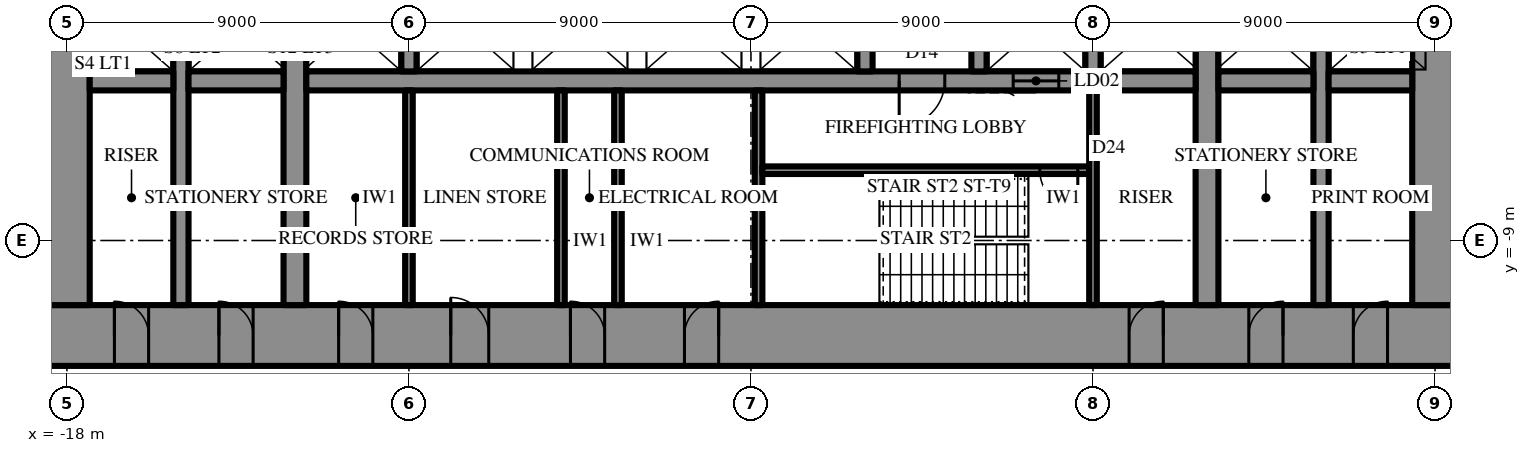
"""IFC4 building model, lengths in metres.
Left out: names, types, materials, properties, quantities, classifications, styles, units other than length and angle.
Written with IfcOpenShell. Run it as: python <this file> out.ifc"""

import sys

from ifc_helpers import new_model, si_unit, direction, frame, frame_2d, origin, place, context, subcontext, project, spatial, rectangle, extrude, element, fill, save


model = new_model("IFC4")
c1 = context("Model", 3, precision=1e-05, world=origin(), true_north=direction((0.0, 1.0)))
c2 = subcontext(c1, "Body", "Model", "MODEL_VIEW")
j1 = project(units=[si_unit("LENGTHUNIT", "METRE"), si_unit("PLANEANGLEUNIT", "RADIAN")], contexts=[c1])
p1 = place(None, origin())
s1 = spatial("IfcSite", under=j1, at=p1, CompositionType="ELEMENT")
p2 = place(p1, origin())
s2 = spatial("IfcBuilding", under=s1, at=p2, CompositionType="ELEMENT")
p3 = place(p2, frame((0.0, 0.0, 18.5)))
s3 = spatial("IfcBuildingStorey", under=s2, at=p3, CompositionType="ELEMENT", Elevation=18.5)
p4 = place(p3, frame((18.6, -11.5, 0.0), z_axis=(0.0, 0.0, 1.0), x_axis=(-1.0, 0.0, 0.0)))
e1 = element("IfcWall", 1, at=p4, inside=s3, PredefinedType="SHEAR", context=c2, shape_type="SweptSolid", body=[
    extrude(rectangle(XDim=37.2, YDim=1.6, at=frame_2d((18.6, 0.0))), origin(), (0.0, 0.0, 1.0), 5.0),
])
p5 = place(p4, frame((19.45, 0.0, 0.0)))
e2 = element("IfcOpeningElement", 2, at=p5, cuts=e1, PredefinedType="OPENING", context=c2, shape_type="SweptSolid", body=[
    extrude(rectangle(XDim=0.9, YDim=2.2, at=frame_2d((0.45, 1.1))), frame((0.0, 0.81, 0.0), z_axis=(0.0, -1.0, 0.0), x_axis=(1.0, 0.0, 0.0)), (0.0, 0.0, 1.0), 1.62),
])
p6 = place(p4, frame((22.45, 0.0, 0.0)))
e3 = element("IfcOpeningElement", 3, at=p6, cuts=e1, PredefinedType="OPENING", context=c2, shape_type="SweptSolid", body=[
    extrude(rectangle(XDim=0.9, YDim=2.2, at=frame_2d((0.45, 1.1))), frame((0.0, 0.81, 0.0), z_axis=(0.0, -1.0, 0.0), x_axis=(1.0, 0.0, 0.0)), (0.0, 0.0, 1.0), 1.62),
])
p7 = place(p4, frame((25.5, 0.0, 0.0)))
e4 = element("IfcOpeningElement", 4, at=p7, cuts=e1, PredefinedType="OPENING", context=c2, shape_type="SweptSolid", body=[
    extrude(rectangle(XDim=1.0, YDim=2.2, at=frame_2d((0.5, 1.1))), frame((0.0, 0.81, 0.0), z_axis=(0.0, -1.0, 0.0), x_axis=(1.0, 0.0, 0.0)), (0.0, 0.0, 1.0), 1.62),
])
p8 = place(p4, frame((1.85, 0.0, 0.0)))
e5 = element("IfcOpeningElement", 5, at=p8, cuts=e1, PredefinedType="OPENING", context=c2, shape_type="SweptSolid", body=[
    extrude(rectangle(XDim=0.9, YDim=2.2, at=frame_2d((0.45, 1.1))), frame((0.0, 0.81, 0.0), z_axis=(0.0, -1.0, 0.0), x_axis=(1.0, 0.0, 0.0)), (0.0, 0.0, 1.0), 1.62),
])
p9 = place(p4, frame((4.6, 0.0, 0.0)))
e6 = element("IfcOpeningElement", 6, at=p9, cuts=e1, PredefinedType="OPENING", context=c2, shape_type="SweptSolid", body=[
    extrude(rectangle(XDim=0.9, YDim=2.2, at=frame_2d((0.45, 1.1))), frame((0.0, 0.81, 0.0), z_axis=(0.0, -1.0, 0.0), x_axis=(1.0, 0.0, 0.0)), (0.0, 0.0, 1.0), 1.62),
])
p10 = place(p4, frame((7.75, 0.0, 0.0)))
e7 = element("IfcOpeningElement", 7, at=p10, cuts=e1, PredefinedType="OPENING", context=c2, shape_type="SweptSolid", body=[
    extrude(rectangle(XDim=0.9, YDim=2.2, at=frame_2d((0.45, 1.1))), frame((0.0, 0.81, 0.0), z_axis=(0.0, -1.0, 0.0), x_axis=(1.0, 0.0, 0.0)), (0.0, 0.0, 1.0), 1.62),
])
p11 = place(p4, frame((28.55, 0.0, 0.0)))
e8 = element("IfcOpeningElement", 8, at=p11, cuts=e1, PredefinedType="OPENING", context=c2, shape_type="SweptSolid", body=[
    extrude(rectangle(XDim=0.9, YDim=2.2, at=frame_2d((0.45, 1.1))), frame((0.0, 0.81, 0.0), z_axis=(0.0, -1.0, 0.0), x_axis=(1.0, 0.0, 0.0)), (0.0, 0.0, 1.0), 1.62),
])
p12 = place(p4, frame((31.7, 0.0, 0.0)))
e9 = element("IfcOpeningElement", 9, at=p12, cuts=e1, PredefinedType="OPENING", context=c2, shape_type="SweptSolid", body=[
    extrude(rectangle(XDim=0.9, YDim=2.2, at=frame_2d((0.45, 1.1))), frame((0.0, 0.81, 0.0), z_axis=(0.0, -1.0, 0.0), x_axis=(1.0, 0.0, 0.0)), (0.0, 0.0, 1.0), 1.62),
])
p13 = place(p4, frame((34.45, 0.0, 0.0)))
e10 = element("IfcOpeningElement", 10, at=p13, cuts=e1, PredefinedType="OPENING", context=c2, shape_type="SweptSolid", body=[
    extrude(rectangle(XDim=0.9, YDim=2.2, at=frame_2d((0.45, 1.1))), frame((0.0, 0.81, 0.0), z_axis=(0.0, -1.0, 0.0), x_axis=(1.0, 0.0, 0.0)), (0.0, 0.0, 1.0), 1.62),
])
p14 = place(p3, frame((18.0, -10.7, 0.0), z_axis=(0.0, 0.0, 1.0), x_axis=(0.0, 1.0, 0.0)))
e11 = element("IfcWall", 11, at=p14, inside=s3, PredefinedType="SHEAR", context=c2, shape_type="SweptSolid", body=[
    extrude(rectangle(XDim=21.4, YDim=1.2, at=frame_2d((10.7, 0.0))), origin(), (0.0, 0.0, 1.0), 5.0),
])
p15 = place(p14, frame((9.8, 0.0, 0.0)))
e12 = element("IfcOpeningElement", 12, at=p15, cuts=e11, PredefinedType="OPENING", context=c2, shape_type="SweptSolid", body=[
    extrude(rectangle(XDim=1.8, YDim=2.4, at=frame_2d((0.9, 1.2))), frame((0.0, 0.61, 0.0), z_axis=(0.0, -1.0, 0.0), x_axis=(1.0, 0.0, 0.0)), (0.0, 0.0, 1.0), 1.22),
])
p16 = place(p3, frame((-18.0, 10.7, 0.0), z_axis=(0.0, 0.0, 1.0), x_axis=(0.0, -1.0, 0.0)))
e13 = element("IfcWall", 13, at=p16, inside=s3, PredefinedType="SHEAR", context=c2, shape_type="SweptSolid", body=[
    extrude(rectangle(XDim=21.4, YDim=1.2, at=frame_2d((10.7, 0.0))), origin(), (0.0, 0.0, 1.0), 5.0),
])
p17 = place(p16, frame((9.8, 0.0, 0.0)))
e14 = element("IfcOpeningElement", 14, at=p17, cuts=e13, PredefinedType="OPENING", context=c2, shape_type="SweptSolid", body=[
    extrude(rectangle(XDim=1.8, YDim=2.4, at=frame_2d((0.9, 1.2))), frame((0.0, 0.61, 0.0), z_axis=(0.0, -1.0, 0.0), x_axis=(1.0, 0.0, 0.0)), (0.0, 0.0, 1.0), 1.22),
])
p18 = place(p3, frame((12.0, -10.7, 0.0), z_axis=(0.0, 0.0, 1.0), x_axis=(0.0, 1.0, 0.0)))
e15 = element("IfcWall", 15, at=p18, inside=s3, PredefinedType="SHEAR", context=c2, shape_type="SweptSolid", body=[
    extrude(rectangle(XDim=21.4, YDim=0.6, at=frame_2d((10.7, 0.0))), origin(), (0.0, 0.0, 1.0), 5.0),
])
p19 = place(p18, frame((9.8, 0.0, 0.0)))
e16 = element("IfcOpeningElement", 16, at=p19, cuts=e15, PredefinedType="OPENING", context=c2, shape_type="SweptSolid", body=[
    extrude(rectangle(XDim=1.8, YDim=2.4, at=frame_2d((0.9, 1.2))), frame((0.0, 0.31, 0.0), z_axis=(0.0, -1.0, 0.0), x_axis=(1.0, 0.0, 0.0)), (0.0, 0.0, 1.0), 0.62),
])
p20 = place(p3, frame((-12.0, -10.7, 0.0), z_axis=(0.0, 0.0, 1.0), x_axis=(0.0, 1.0, 0.0)))
e17 = element("IfcWall", 17, at=p20, inside=s3, PredefinedType="SHEAR", context=c2, shape_type="SweptSolid", body=[
    extrude(rectangle(XDim=21.4, YDim=0.6, at=frame_2d((10.7, 0.0))), origin(), (0.0, 0.0, 1.0), 5.0),
])
p21 = place(p20, frame((9.8, 0.0, 0.0)))
e18 = element("IfcOpeningElement", 18, at=p21, cuts=e17, PredefinedType="OPENING", context=c2, shape_type="SweptSolid", body=[
    extrude(rectangle(XDim=1.8, YDim=2.4, at=frame_2d((0.9, 1.2))), frame((0.0, 0.31, 0.0), z_axis=(0.0, -1.0, 0.0), x_axis=(1.0, 0.0, 0.0)), (0.0, 0.0, 1.0), 0.62),
])
p22 = place(p3, frame((15.0, -10.7, 0.0), z_axis=(0.0, 0.0, 1.0), x_axis=(0.0, 1.0, 0.0)))
e19 = element("IfcWall", 19, at=p22, inside=s3, PredefinedType="SHEAR", context=c2, shape_type="SweptSolid", body=[
    extrude(rectangle(XDim=21.4, YDim=0.4, at=frame_2d((10.7, 0.0))), origin(), (0.0, 0.0, 1.0), 5.0),
])
p23 = place(p22, frame((9.8, 0.0, 0.0)))
e20 = element("IfcOpeningElement", 20, at=p23, cuts=e19, PredefinedType="OPENING", context=c2, shape_type="SweptSolid", body=[
    extrude(rectangle(XDim=1.8, YDim=2.4, at=frame_2d((0.9, 1.2))), frame((0.0, 0.21, 0.0), z_axis=(0.0, -1.0, 0.0), x_axis=(1.0, 0.0, 0.0)), (0.0, 0.0, 1.0), 0.42),
])
p24 = place(p3, frame((-15.0, -10.7, 0.0), z_axis=(0.0, 0.0, 1.0), x_axis=(0.0, 1.0, 0.0)))
e21 = element("IfcWall", 21, at=p24, inside=s3, PredefinedType="SHEAR", context=c2, shape_type="SweptSolid", body=[
    extrude(rectangle(XDim=21.4, YDim=0.4, at=frame_2d((10.7, 0.0))), origin(), (0.0, 0.0, 1.0), 5.0),
])
p25 = place(p24, frame((9.8, 0.0, 0.0)))
e22 = element("IfcOpeningElement", 22, at=p25, cuts=e21, PredefinedType="OPENING", context=c2, shape_type="SweptSolid", body=[
    extrude(rectangle(XDim=1.8, YDim=2.4, at=frame_2d((0.9, 1.2))), frame((0.0, 0.21, 0.0), z_axis=(0.0, -1.0, 0.0), x_axis=(1.0, 0.0, 0.0)), (0.0, 0.0, 1.0), 0.42),
])
p26 = place(p3, frame((17.4, -4.8, 0.0), z_axis=(0.0, 0.0, 1.0), x_axis=(-1.0, 0.0, 0.0)))
e23 = element("IfcWall", 23, at=p26, inside=s3, PredefinedType="SHEAR", context=c2, shape_type="SweptSolid", body=[
    extrude(rectangle(XDim=2.2, YDim=0.5, at=frame_2d((1.1, 0.0))), origin(), (0.0, 0.0, 1.0), 5.0),
])
p27 = place(p3, frame((14.8, -4.8, 0.0), z_axis=(0.0, 0.0, 1.0), x_axis=(-1.0, 0.0, 0.0)))
e24 = element("IfcWall", 24, at=p27, inside=s3, PredefinedType="SHEAR", context=c2, shape_type="SweptSolid", body=[
    extrude(rectangle(XDim=2.5, YDim=0.5, at=frame_2d((1.25, 0.0))), origin(), (0.0, 0.0, 1.0), 5.0),
])
p28 = place(p3, frame((11.7, -4.8, 0.0), z_axis=(0.0, 0.0, 1.0), x_axis=(-1.0, 0.0, 0.0)))
e25 = element("IfcWall", 25, at=p28, inside=s3, PredefinedType="SHEAR", context=c2, shape_type="SweptSolid", body=[
    extrude(rectangle(XDim=23.4, YDim=0.5, at=frame_2d((11.7, 0.0))), origin(), (0.0, 0.0, 1.0), 5.0),
])
p29 = place(p28, frame((6.6, 0.0, 0.0)))
e26 = element("IfcOpeningElement", 26, at=p29, cuts=e25, PredefinedType="OPENING", context=c2, shape_type="SweptSolid", body=[
    extrude(rectangle(XDim=1.2, YDim=2.2, at=frame_2d((0.6, 1.1))), frame((0.0, 0.26, 0.0), z_axis=(0.0, -1.0, 0.0), x_axis=(1.0, 0.0, 0.0)), (0.0, 0.0, 1.0), 0.52),
])
p30 = place(p28, frame((3.6, 0.0, 0.0)))
e27 = element("IfcOpeningElement", 27, at=p30, cuts=e25, PredefinedType="OPENING", context=c2, shape_type="SweptSolid", body=[
    extrude(rectangle(XDim=1.2, YDim=2.2, at=frame_2d((0.6, 1.1))), frame((0.0, 0.26, 0.0), z_axis=(0.0, -1.0, 0.0), x_axis=(1.0, 0.0, 0.0)), (0.0, 0.0, 1.0), 0.52),
])
p31 = place(p3, frame((-12.3, -4.8, 0.0), z_axis=(0.0, 0.0, 1.0), x_axis=(-1.0, 0.0, 0.0)))
e28 = element("IfcWall", 28, at=p31, inside=s3, PredefinedType="SHEAR", context=c2, shape_type="SweptSolid", body=[
    extrude(rectangle(XDim=2.5, YDim=0.5, at=frame_2d((1.25, 0.0))), origin(), (0.0, 0.0, 1.0), 5.0),
])
p32 = place(p3, frame((-15.2, -4.8, 0.0), z_axis=(0.0, 0.0, 1.0), x_axis=(-1.0, 0.0, 0.0)))
e29 = element("IfcWall", 29, at=p32, inside=s3, PredefinedType="SHEAR", context=c2, shape_type="SweptSolid", body=[
    extrude(rectangle(XDim=2.2, YDim=0.5, at=frame_2d((1.1, 0.0))), origin(), (0.0, 0.0, 1.0), 5.0),
])
for number, where, z_axis, x_axis in (
    (30, (9.0, -2.25, 0.0), (0.0, 0.0, 1.0), (0.0, -1.0, 0.0)),
    (31, (6.0, -2.25, 0.0), (0.0, 0.0, 1.0), (0.0, -1.0, 0.0)),
    (32, (3.0, -2.25, 0.0), (0.0, 0.0, 1.0), (0.0, -1.0, 0.0)),
    (33, (-9.0, -2.25, 0.0), (0.0, 0.0, 1.0), (0.0, -1.0, 0.0)),
):
    element("IfcWall", number, at=place(p3, frame(where, z_axis=z_axis, x_axis=x_axis)), inside=s3, PredefinedType="SHEAR", context=c2, shape_type="SweptSolid", body=[
        extrude(rectangle(XDim=2.3, YDim=0.4, at=frame_2d((1.15, 0.0))), origin(), (0.0, 0.0, 1.0), 5.0),
    ])
p33 = place(p3, frame((0.2, -5.05, 0.0), z_axis=(0.0, 0.0, 1.0), x_axis=(0.0, -1.0, 0.0)))
e34 = element("IfcWall", 34, at=p33, inside=s3, PredefinedType="SHEAR", context=c2, shape_type="SweptSolid", body=[
    extrude(rectangle(XDim=5.65, YDim=0.2, at=frame_2d((2.825, 0.0))), origin(), (0.0, 0.0, 1.0), 5.0),
])
p34 = place(p3, frame((8.9, -7.15, 0.0), z_axis=(0.0, 0.0, 1.0), x_axis=(-1.0, 0.0, 0.0)))
e35 = element("IfcWall", 35, at=p34, inside=s3, PredefinedType="SHEAR", context=c2, shape_type="SweptSolid", body=[
    extrude(rectangle(XDim=8.6, YDim=0.2, at=frame_2d((4.3, 0.0))), origin(), (0.0, 0.0, 1.0), 5.0),
])
p35 = place(p34, frame((0.3, 0.0, 0.0)))
e36 = element("IfcOpeningElement", 36, at=p35, cuts=e35, PredefinedType="OPENING", context=c2, shape_type="SweptSolid", body=[
    extrude(rectangle(XDim=1.0, YDim=2.2, at=frame_2d((0.5, 1.1))), frame((0.0, 0.11, 0.0), z_axis=(0.0, -1.0, 0.0), x_axis=(1.0, 0.0, 0.0)), (0.0, 0.0, 1.0), 0.22),
])
for number, where, z_axis, x_axis in (
    (37, (9.0, -5.05, 0.0), (0.0, 0.0, 1.0), (0.0, -1.0, 0.0)),
    (38, (-9.0, -5.05, 0.0), (0.0, 0.0, 1.0), (0.0, -1.0, 0.0)),
    (39, (-3.5, -5.05, 0.0), (0.0, 0.0, 1.0), (0.0, -1.0, 0.0)),
    (40, (-5.0, -5.05, 0.0), (0.0, 0.0, 1.0), (0.0, -1.0, 0.0)),
):
    element("IfcWall", number, at=place(p3, frame(where, z_axis=z_axis, x_axis=x_axis)), inside=s3, PredefinedType="PARTITIONING", context=c2, shape_type="SweptSolid", body=[
        extrude(rectangle(XDim=5.65, YDim=0.2, at=frame_2d((2.825, 0.0))), origin(), (0.0, 0.0, 1.0), 4.65),
    ])
p36 = place(p29, origin())
e41 = element("IfcDoor", 41, at=p36, inside=s3, OperationType="SINGLE_SWING_LEFT", PredefinedType="DOOR", context=c2, shape_type="SweptSolid", body=[
    extrude(rectangle(XDim=1.2, YDim=2.2, at=frame_2d((0.6, 1.1))), frame((0.0, 0.025, 0.0), z_axis=(0.0, -1.0, 0.0), x_axis=(1.0, 0.0, 0.0)), (0.0, 0.0, 1.0), 0.05),
])
fill(e26, e41)
p37 = place(p35, origin())
e42 = element("IfcDoor", 42, at=p37, inside=s3, OperationType="SINGLE_SWING_RIGHT", PredefinedType="DOOR", context=c2, shape_type="SweptSolid", body=[
    extrude(rectangle(XDim=1.0, YDim=2.2, at=frame_2d((0.5, 1.1))), frame((0.0, 0.025, 0.0), z_axis=(0.0, -1.0, 0.0), x_axis=(1.0, 0.0, 0.0)), (0.0, 0.0, 1.0), 0.05),
])
fill(e36, e42)
p38 = place(p5, frame((0.9, 0.0, 0.0), z_axis=(0.0, 0.0, 1.0), x_axis=(-1.0, 0.0, 0.0)))
e43 = element("IfcDoor", 43, at=p38, inside=s3, OperationType="SINGLE_SWING_LEFT", PredefinedType="DOOR", context=c2, shape_type="SweptSolid", body=[
    extrude(rectangle(XDim=0.9, YDim=2.2, at=frame_2d((0.45, 1.1))), frame((0.0, 0.025, 0.0), z_axis=(0.0, -1.0, 0.0), x_axis=(1.0, 0.0, 0.0)), (0.0, 0.0, 1.0), 0.05),
])
fill(e2, e43)
p39 = place(p6, frame((0.9, 0.0, 0.0), z_axis=(0.0, 0.0, 1.0), x_axis=(-1.0, 0.0, 0.0)))
e44 = element("IfcDoor", 44, at=p39, inside=s3, OperationType="SINGLE_SWING_RIGHT", PredefinedType="DOOR", context=c2, shape_type="SweptSolid", body=[
    extrude(rectangle(XDim=0.9, YDim=2.2, at=frame_2d((0.45, 1.1))), frame((0.0, 0.025, 0.0), z_axis=(0.0, -1.0, 0.0), x_axis=(1.0, 0.0, 0.0)), (0.0, 0.0, 1.0), 0.05),
])
fill(e3, e44)
p40 = place(p7, frame((1.0, 0.0, 0.0), z_axis=(0.0, 0.0, 1.0), x_axis=(-1.0, 0.0, 0.0)))
e45 = element("IfcDoor", 45, at=p40, inside=s3, OperationType="SINGLE_SWING_RIGHT", PredefinedType="DOOR", context=c2, shape_type="SweptSolid", body=[
    extrude(rectangle(XDim=1.0, YDim=2.2, at=frame_2d((0.5, 1.1))), frame((0.0, 0.025, 0.0), z_axis=(0.0, -1.0, 0.0), x_axis=(1.0, 0.0, 0.0)), (0.0, 0.0, 1.0), 0.05),
])
fill(e4, e45)
p41 = place(p8, frame((0.9, 0.0, 0.0), z_axis=(0.0, 0.0, 1.0), x_axis=(-1.0, 0.0, 0.0)))
e46 = element("IfcDoor", 46, at=p41, inside=s3, OperationType="SINGLE_SWING_LEFT", PredefinedType="DOOR", context=c2, shape_type="SweptSolid", body=[
    extrude(rectangle(XDim=0.9, YDim=2.2, at=frame_2d((0.45, 1.1))), frame((0.0, 0.025, 0.0), z_axis=(0.0, -1.0, 0.0), x_axis=(1.0, 0.0, 0.0)), (0.0, 0.0, 1.0), 0.05),
])
fill(e5, e46)
p42 = place(p9, frame((0.9, 0.0, 0.0), z_axis=(0.0, 0.0, 1.0), x_axis=(-1.0, 0.0, 0.0)))
e47 = element("IfcDoor", 47, at=p42, inside=s3, OperationType="SINGLE_SWING_LEFT", PredefinedType="DOOR", context=c2, shape_type="SweptSolid", body=[
    extrude(rectangle(XDim=0.9, YDim=2.2, at=frame_2d((0.45, 1.1))), frame((0.0, 0.025, 0.0), z_axis=(0.0, -1.0, 0.0), x_axis=(1.0, 0.0, 0.0)), (0.0, 0.0, 1.0), 0.05),
])
fill(e6, e47)
p43 = place(p10, frame((0.9, 0.0, 0.0), z_axis=(0.0, 0.0, 1.0), x_axis=(-1.0, 0.0, 0.0)))
e48 = element("IfcDoor", 48, at=p43, inside=s3, OperationType="SINGLE_SWING_LEFT", PredefinedType="DOOR", context=c2, shape_type="SweptSolid", body=[
    extrude(rectangle(XDim=0.9, YDim=2.2, at=frame_2d((0.45, 1.1))), frame((0.0, 0.025, 0.0), z_axis=(0.0, -1.0, 0.0), x_axis=(1.0, 0.0, 0.0)), (0.0, 0.0, 1.0), 0.05),
])
fill(e7, e48)
p44 = place(p11, frame((0.9, 0.0, 0.0), z_axis=(0.0, 0.0, 1.0), x_axis=(-1.0, 0.0, 0.0)))
e49 = element("IfcDoor", 49, at=p44, inside=s3, OperationType="SINGLE_SWING_RIGHT", PredefinedType="DOOR", context=c2, shape_type="SweptSolid", body=[
    extrude(rectangle(XDim=0.9, YDim=2.2, at=frame_2d((0.45, 1.1))), frame((0.0, 0.025, 0.0), z_axis=(0.0, -1.0, 0.0), x_axis=(1.0, 0.0, 0.0)), (0.0, 0.0, 1.0), 0.05),
])
fill(e8, e49)
p45 = place(p12, frame((0.9, 0.0, 0.0), z_axis=(0.0, 0.0, 1.0), x_axis=(-1.0, 0.0, 0.0)))
e50 = element("IfcDoor", 50, at=p45, inside=s3, OperationType="SINGLE_SWING_RIGHT", PredefinedType="DOOR", context=c2, shape_type="SweptSolid", body=[
    extrude(rectangle(XDim=0.9, YDim=2.2, at=frame_2d((0.45, 1.1))), frame((0.0, 0.025, 0.0), z_axis=(0.0, -1.0, 0.0), x_axis=(1.0, 0.0, 0.0)), (0.0, 0.0, 1.0), 0.05),
])
fill(e9, e50)
p46 = place(p13, frame((0.9, 0.0, 0.0), z_axis=(0.0, 0.0, 1.0), x_axis=(-1.0, 0.0, 0.0)))
e51 = element("IfcDoor", 51, at=p46, inside=s3, OperationType="SINGLE_SWING_RIGHT", PredefinedType="DOOR", context=c2, shape_type="SweptSolid", body=[
    extrude(rectangle(XDim=0.9, YDim=2.2, at=frame_2d((0.45, 1.1))), frame((0.0, 0.025, 0.0), z_axis=(0.0, -1.0, 0.0), x_axis=(1.0, 0.0, 0.0)), (0.0, 0.0, 1.0), 0.05),
])
fill(e10, e51)
p47 = place(p30, origin())
e52 = element("IfcDoor", 52, at=p47, inside=s3, OperationType="SLIDING_TO_LEFT", PredefinedType="DOOR", context=c2, shape_type="SweptSolid", body=[
    extrude(rectangle(XDim=1.2, YDim=2.2, at=frame_2d((0.6, 1.1))), frame((0.0, 0.025, 0.0), z_axis=(0.0, -1.0, 0.0), x_axis=(1.0, 0.0, 0.0)), (0.0, 0.0, 1.0), 0.05),
])
fill(e27, e52)
save(model, sys.argv[1])
